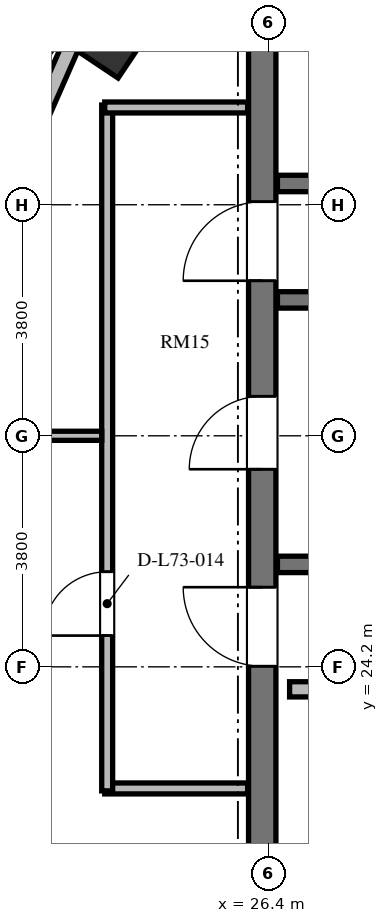
"""IFC4 building model, lengths in metres.
Left out: names, types, materials, properties, quantities, classifications, styles, units other than length and angle.
Written with IfcOpenShell. Run it as: python <this file> out.ifc"""

import sys

from ifc_helpers import new_model, si_unit, direction, frame, frame_2d, origin, origin_2d, place, context, subcontext, project, spatial, rectangle, extrude, element, fill, save


model = new_model("IFC4")
c1 = context("Model", 3, precision=1e-05, world=origin(), true_north=direction((0.0, 1.0)))
c2 = subcontext(c1, "Body", "Model", "MODEL_VIEW")
j1 = project(units=[si_unit("LENGTHUNIT", "METRE"), si_unit("PLANEANGLEUNIT", "RADIAN")], contexts=[c1])
p1 = place(None, origin())
s1 = spatial("IfcSite", under=j1, at=p1, CompositionType="ELEMENT")
p2 = place(p1, origin())
s2 = spatial("IfcBuilding", under=s1, at=p2, CompositionType="ELEMENT")
p3 = place(p2, frame((0.0, 0.0, 280.56)))
s3 = spatial("IfcBuildingStorey", under=s2, at=p3, CompositionType="ELEMENT", Elevation=280.56)
p4 = place(p3, frame((23.694, 34.522, 0.0), z_axis=(0.0, 0.0, 1.0), x_axis=(-0.831469612303, 0.55557023302, 0.0)))
e1 = element("IfcColumn", 1, at=p4, inside=s3, PredefinedType="COLUMN", context=c2, shape_type="SweptSolid", body=[
    extrude(rectangle(XDim=1.1, YDim=0.8, at=origin_2d()), origin(), (0.0, 0.0, 1.0), 3.648),
])
p5 = place(p3, frame((26.3, 20.95, 0.0), z_axis=(0.0, 0.0, 1.0), x_axis=(0.0, 1.0, 0.0)))
e2 = element("IfcWall", 2, at=p5, inside=s3, PredefinedType="SHEAR", context=c2, shape_type="SweptSolid", body=[
    extrude(rectangle(XDim=14.1, YDim=0.45, at=frame_2d((7.05, 0.0))), origin(), (0.0, 0.0, 1.0), 3.648),
])
p6 = place(p5, frame((6.5, 0.0, 0.0)))
e3 = element("IfcOpeningElement", 3, at=p6, cuts=e2, PredefinedType="OPENING", context=c2, shape_type="SweptSolid", body=[
    extrude(rectangle(XDim=1.2, YDim=2.15, at=frame_2d((0.6, 1.075))), frame((0.0, 0.235, 0.0), z_axis=(0.0, -1.0, 0.0), x_axis=(1.0, 0.0, 0.0)), (0.0, 0.0, 1.0), 0.47),
])
p7 = place(p5, frame((9.6, 0.0, 0.0)))
e4 = element("IfcOpeningElement", 4, at=p7, cuts=e2, PredefinedType="OPENING", context=c2, shape_type="SweptSolid", body=[
    extrude(rectangle(XDim=1.3, YDim=2.2, at=frame_2d((0.65, 1.1))), frame((0.0, 0.235, 0.0), z_axis=(0.0, -1.0, 0.0), x_axis=(1.0, 0.0, 0.0)), (0.0, 0.0, 1.0), 0.47),
])
p8 = place(p5, frame((3.26, 0.0, 0.0)))
e5 = element("IfcOpeningElement", 5, at=p8, cuts=e2, PredefinedType="OPENING", context=c2, shape_type="SweptSolid", body=[
    extrude(rectangle(XDim=1.3, YDim=2.2, at=frame_2d((0.65, 1.1))), frame((0.0, 0.235, 0.0), z_axis=(0.0, -1.0, 0.0), x_axis=(1.0, 0.0, 0.0)), (0.0, 0.0, 1.0), 0.47),
])
p9 = place(p3, frame((23.352, 34.869, 0.0), z_axis=(0.0, 0.0, 1.0), x_axis=(-0.402882523888, -0.915251698685, 0.0)))
e6 = element("IfcWall", 6, at=p9, inside=s3, PredefinedType="SOLIDWALL", context=c2, shape_type="SweptSolid", body=[
    extrude(rectangle(XDim=5.856, YDim=0.28, at=frame_2d((2.928, 0.0))), origin(), (0.0, 0.0, 1.0), 3.448),
])
p10 = place(p9, frame((2.328, 0.0, 0.85)))
e7 = element("IfcOpeningElement", 7, at=p10, cuts=e6, PredefinedType="OPENING", context=c2, shape_type="SweptSolid", body=[
    extrude(rectangle(XDim=1.2, YDim=1.8, at=frame_2d((0.6, 0.9))), frame((0.0, 0.15, 0.0), z_axis=(0.0, -1.0, 0.0), x_axis=(1.0, 0.0, 0.0)), (0.0, 0.0, 1.0), 0.3),
])
p11 = place(p3, frame((20.993, 24.09, 0.0), z_axis=(0.0, 0.0, 1.0), x_axis=(0.402867150469, -0.91525846572, 0.0)))
e8 = element("IfcWall", 8, at=p11, inside=s3, PredefinedType="SOLIDWALL", context=c2, shape_type="SweptSolid", body=[
    extrude(rectangle(XDim=5.856, YDim=0.28, at=frame_2d((2.928, 0.0))), origin(), (0.0, 0.0, 1.0), 3.448),
])
p12 = place(p11, frame((2.328, 0.0, 0.85)))
e9 = element("IfcOpeningElement", 9, at=p12, cuts=e8, PredefinedType="OPENING", context=c2, shape_type="SweptSolid", body=[
    extrude(rectangle(XDim=1.2, YDim=1.8, at=frame_2d((0.6, 0.9))), frame((0.0, 0.15, 0.0), z_axis=(0.0, -1.0, 0.0), x_axis=(1.0, 0.0, 0.0)), (0.0, 0.0, 1.0), 0.3),
])
for number, where, z_axis, x_axis in (
    (10, (26.55, 30.235, 0.0), (0.0, 0.0, 1.0), (1.0, 0.0, 0.0)),
    (11, (26.55, 25.885, 0.0), (0.0, 0.0, 1.0), (1.0, 0.0, 0.0)),
):
    element("IfcWall", number, at=place(p3, frame(where, z_axis=z_axis, x_axis=x_axis)), inside=s3, PredefinedType="SHEAR", context=c2, shape_type="SweptSolid", body=[
        extrude(rectangle(XDim=7.985, YDim=0.27, at=frame_2d((3.992, 0.0))), origin(), (0.0, 0.0, 1.0), 3.648),
    ])
p13 = place(p3, frame((26.55, 32.15, 0.0), z_axis=(0.0, 0.0, 1.0), x_axis=(1.0, 0.0, 0.0)))
e12 = element("IfcWall", 12, at=p13, inside=s3, PredefinedType="SHEAR", context=c2, shape_type="SweptSolid", body=[
    extrude(rectangle(XDim=16.4, YDim=0.27, at=frame_2d((8.2, 0.0))), origin(), (0.0, 0.0, 1.0), 3.648),
])
p14 = place(p13, frame((1.375, 0.0, 0.0)))
e13 = element("IfcOpeningElement", 13, at=p14, cuts=e12, PredefinedType="OPENING", context=c2, shape_type="SweptSolid", body=[
    extrude(rectangle(XDim=1.05, YDim=2.15, at=frame_2d((0.525, 1.075))), frame((0.0, 0.145, 0.0), z_axis=(0.0, -1.0, 0.0), x_axis=(1.0, 0.0, 0.0)), (0.0, 0.0, 1.0), 0.29),
])
p15 = place(p13, frame((4.975, 0.0, 0.0)))
e14 = element("IfcOpeningElement", 14, at=p15, cuts=e12, PredefinedType="OPENING", context=c2, shape_type="SweptSolid", body=[
    extrude(rectangle(XDim=1.05, YDim=2.15, at=frame_2d((0.525, 1.075))), frame((0.0, 0.145, 0.0), z_axis=(0.0, -1.0, 0.0), x_axis=(1.0, 0.0, 0.0)), (0.0, 0.0, 1.0), 0.29),
])
p16 = place(p13, frame((8.625, 0.0, 0.0)))
e15 = element("IfcOpeningElement", 15, at=p16, cuts=e12, PredefinedType="OPENING", context=c2, shape_type="SweptSolid", body=[
    extrude(rectangle(XDim=1.05, YDim=2.15, at=frame_2d((0.525, 1.075))), frame((0.0, 0.145, 0.0), z_axis=(0.0, -1.0, 0.0), x_axis=(1.0, 0.0, 0.0)), (0.0, 0.0, 1.0), 0.29),
])
p17 = place(p13, frame((11.9, 0.0, 0.0)))
e16 = element("IfcOpeningElement", 16, at=p17, cuts=e12, PredefinedType="OPENING", context=c2, shape_type="SweptSolid", body=[
    extrude(rectangle(XDim=1.1, YDim=2.2, at=frame_2d((0.55, 1.1))), frame((0.0, 0.145, 0.0), z_axis=(0.0, -1.0, 0.0), x_axis=(1.0, 0.0, 0.0)), (0.0, 0.0, 1.0), 0.29),
])
p18 = place(p13, frame((14.5, 0.0, 0.0)))
e17 = element("IfcOpeningElement", 17, at=p18, cuts=e12, PredefinedType="OPENING", context=c2, shape_type="SweptSolid", body=[
    extrude(rectangle(XDim=1.1, YDim=2.2, at=frame_2d((0.55, 1.1))), frame((0.0, 0.145, 0.0), z_axis=(0.0, -1.0, 0.0), x_axis=(1.0, 0.0, 0.0)), (0.0, 0.0, 1.0), 0.29),
])
p19 = place(p3, frame((26.75, 23.83, 0.0), z_axis=(0.0, 0.0, 1.0), x_axis=(1.0, 0.0, 0.0)))
e18 = element("IfcWall", 18, at=p19, inside=s3, PredefinedType="SOLIDWALL", context=c2, shape_type="SweptSolid", body=[
    extrude(rectangle(XDim=16.2, YDim=0.25, at=frame_2d((8.1, 0.0))), origin(), (0.0, 0.0, 1.0), 3.448),
])
p20 = place(p19, frame((2.025, 0.0, 0.0)))
e19 = element("IfcOpeningElement", 19, at=p20, cuts=e18, PredefinedType="OPENING", context=c2, shape_type="SweptSolid", body=[
    extrude(rectangle(XDim=1.05, YDim=2.15, at=frame_2d((0.525, 1.075))), frame((0.0, 0.135, 0.0), z_axis=(0.0, -1.0, 0.0), x_axis=(1.0, 0.0, 0.0)), (0.0, 0.0, 1.0), 0.27),
])
p21 = place(p19, frame((7.25, 0.0, 0.0)))
e20 = element("IfcOpeningElement", 20, at=p21, cuts=e18, PredefinedType="OPENING", context=c2, shape_type="SweptSolid", body=[
    extrude(rectangle(XDim=1.4, YDim=2.2, at=frame_2d((0.7, 1.1))), frame((0.0, 0.135, 0.0), z_axis=(0.0, -1.0, 0.0), x_axis=(1.0, 0.0, 0.0)), (0.0, 0.0, 1.0), 0.27),
])
p22 = place(p19, frame((11.7, 0.0, 0.0)))
e21 = element("IfcOpeningElement", 21, at=p22, cuts=e18, PredefinedType="OPENING", context=c2, shape_type="SweptSolid", body=[
    extrude(rectangle(XDim=1.1, YDim=2.2, at=frame_2d((0.55, 1.1))), frame((0.0, 0.135, 0.0), z_axis=(0.0, -1.0, 0.0), x_axis=(1.0, 0.0, 0.0)), (0.0, 0.0, 1.0), 0.27),
])
p23 = place(p19, frame((14.15, 0.0, 0.0)))
e22 = element("IfcOpeningElement", 22, at=p23, cuts=e18, PredefinedType="OPENING", context=c2, shape_type="SweptSolid", body=[
    extrude(rectangle(XDim=1.4, YDim=2.3, at=frame_2d((0.7, 1.15))), frame((0.0, 0.135, 0.0), z_axis=(0.0, -1.0, 0.0), x_axis=(1.0, 0.0, 0.0)), (0.0, 0.0, 1.0), 0.27),
])
p24 = place(p3, frame((26.06, 22.2, 0.0), z_axis=(0.0, 0.0, 1.0), x_axis=(-1.0, 0.0, 0.0)))
e23 = element("IfcWall", 23, at=p24, inside=s3, PredefinedType="PARTITIONING", context=c2, shape_type="SweptSolid", body=[
    extrude(rectangle(XDim=2.35, YDim=0.18, at=frame_2d((1.175, 0.0))), origin(), (0.0, 0.0, 1.0), 3.448),
])
p25 = place(p3, frame((23.75, 22.16, 0.0), z_axis=(0.0, 0.0, 1.0), x_axis=(0.0, 1.0, 0.0)))
e24 = element("IfcWall", 24, at=p25, inside=s3, PredefinedType="PARTITIONING", context=c2, shape_type="SweptSolid", body=[
    extrude(rectangle(XDim=11.28, YDim=0.18, at=frame_2d((5.64, 0.0))), origin(), (0.0, 0.0, 1.0), 3.448),
])
p26 = place(p25, frame((2.554, 0.0, 0.0)))
e25 = element("IfcOpeningElement", 25, at=p26, cuts=e24, PredefinedType="OPENING", context=c2, shape_type="SweptSolid", body=[
    extrude(rectangle(XDim=1.05, YDim=2.15, at=frame_2d((0.525, 1.075))), frame((0.0, 0.1, 0.0), z_axis=(0.0, -1.0, 0.0), x_axis=(1.0, 0.0, 0.0)), (0.0, 0.0, 1.0), 0.2),
])
p27 = place(p3, frame((23.71, 33.4, 0.0), z_axis=(0.0, 0.0, 1.0), x_axis=(1.0, 0.0, 0.0)))
e26 = element("IfcWall", 26, at=p27, inside=s3, PredefinedType="PARTITIONING", context=c2, shape_type="SweptSolid", body=[
    extrude(rectangle(XDim=2.35, YDim=0.18, at=frame_2d((1.175, 0.0))), origin(), (0.0, 0.0, 1.0), 3.448),
])
p28 = place(p3, frame((21.068, 28.0, 0.0), z_axis=(0.0, 0.0, 1.0), x_axis=(1.0, 0.0, 0.0)))
e27 = element("IfcWall", 27, at=p28, inside=s3, PredefinedType="PARTITIONING", context=c2, shape_type="SweptSolid", body=[
    extrude(rectangle(XDim=2.592, YDim=0.15, at=frame_2d((1.296, 0.0))), origin(), (0.0, 0.0, 1.0), 3.448),
])
p29 = place(p6, origin())
e28 = element("IfcDoor", 28, at=p29, inside=s3, OperationType="SINGLE_SWING_LEFT", PredefinedType="DOOR", context=c2, shape_type="SweptSolid", body=[
    extrude(rectangle(XDim=1.2, YDim=2.15, at=frame_2d((0.6, 1.075))), frame((0.0, 0.025, 0.0), z_axis=(0.0, -1.0, 0.0), x_axis=(1.0, 0.0, 0.0)), (0.0, 0.0, 1.0), 0.05),
])
fill(e3, e28)
p30 = place(p7, origin())
e29 = element("IfcDoor", 29, at=p30, inside=s3, OperationType="SINGLE_SWING_LEFT", PredefinedType="DOOR", context=c2, shape_type="SweptSolid", body=[
    extrude(rectangle(XDim=1.3, YDim=2.2, at=frame_2d((0.65, 1.1))), frame((0.0, 0.025, 0.0), z_axis=(0.0, -1.0, 0.0), x_axis=(1.0, 0.0, 0.0)), (0.0, 0.0, 1.0), 0.05),
])
fill(e4, e29)
p31 = place(p8, origin())
e30 = element("IfcDoor", 30, at=p31, inside=s3, OperationType="SINGLE_SWING_RIGHT", PredefinedType="DOOR", context=c2, shape_type="SweptSolid", body=[
    extrude(rectangle(XDim=1.3, YDim=2.2, at=frame_2d((0.65, 1.1))), frame((0.0, 0.025, 0.0), z_axis=(0.0, -1.0, 0.0), x_axis=(1.0, 0.0, 0.0)), (0.0, 0.0, 1.0), 0.05),
])
fill(e5, e30)
p32 = place(p26, origin())
e31 = element("IfcDoor", 31, at=p32, inside=s3, OperationType="SINGLE_SWING_LEFT", PredefinedType="DOOR", context=c2, shape_type="SweptSolid", body=[
    extrude(rectangle(XDim=1.05, YDim=2.15, at=frame_2d((0.525, 1.075))), frame((0.0, 0.025, 0.0), z_axis=(0.0, -1.0, 0.0), x_axis=(1.0, 0.0, 0.0)), (0.0, 0.0, 1.0), 0.05),
])
fill(e25, e31)
save(model, sys.argv[1])
